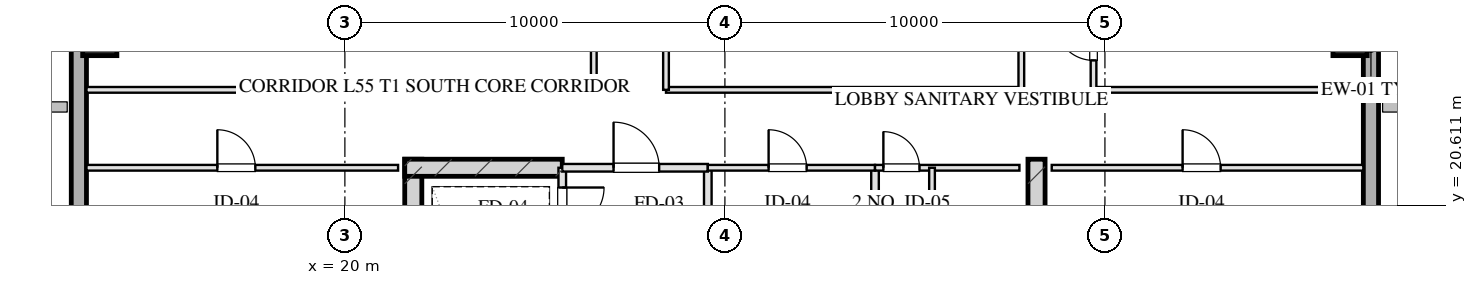
"""IFC4 building model, lengths in metres.
Left out: names, types, materials, properties, quantities, classifications, styles, units other than length and angle.
Written with IfcOpenShell. Run it as: python <this file> out.ifc"""

import sys

from ifc_helpers import new_model, si_unit, direction, frame, frame_2d, origin, origin_2d, place, context, subcontext, project, spatial, rectangle, hollow_rectangle, extrude, element, fill, save


model = new_model("IFC4")
c1 = context("Model", 3, precision=1e-05, world=origin(), true_north=direction((0.0, 1.0)))
c2 = subcontext(c1, "Body", "Model", "MODEL_VIEW")
j1 = project(units=[si_unit("LENGTHUNIT", "METRE"), si_unit("PLANEANGLEUNIT", "RADIAN")], contexts=[c1])
p1 = place(None, origin())
s1 = spatial("IfcSite", under=j1, at=p1, CompositionType="ELEMENT")
p2 = place(p1, origin())
s2 = spatial("IfcBuilding", under=s1, at=p2, CompositionType="ELEMENT")
p3 = place(p2, frame((0.0, 0.0, 205.85)))
s3 = spatial("IfcBuildingStorey", under=s2, at=p3, CompositionType="ELEMENT", Elevation=205.85)
for number, where, z_axis, x_axis in (
    (1, (21.8, 21.825, 0.0), (0.0, 0.0, 1.0), (0.0, -1.0, 0.0)),
    (2, (38.2, 21.825, 0.0), (0.0, 0.0, 1.0), (0.0, -1.0, 0.0)),
):
    element("IfcWall", number, at=place(p3, frame(where, z_axis=z_axis, x_axis=x_axis)), inside=s3, PredefinedType="SHEAR", context=c2, shape_type="SweptSolid", body=[
        extrude(rectangle(XDim=9.33, YDim=0.45, at=frame_2d((4.665, 0.0))), origin(), (0.0, 0.0, 1.0), 3.45),
    ])
p4 = place(p3, frame((21.575, 21.6, 0.0), z_axis=(0.0, 0.0, 1.0), x_axis=(1.0, 0.0, 0.0)))
e3 = element("IfcWall", 3, at=p4, inside=s3, PredefinedType="SHEAR", context=c2, shape_type="SweptSolid", body=[
    extrude(rectangle(XDim=4.145, YDim=0.45, at=frame_2d((2.073, 0.0))), origin(), (0.0, 0.0, 1.0), 3.45),
])
for number, where, z_axis, x_axis in (
    (4, (13.55, 25.0, 0.0), (0.0, 0.0, 1.0), (1.0, 0.0, 0.0)),
    (5, (46.45, 25.0, 0.0), (0.0, 0.0, 1.0), (1.0, 0.0, 0.0)),
):
    element("IfcColumn", number, at=place(p3, frame(where, z_axis=z_axis, x_axis=x_axis)), inside=s3, PredefinedType="COLUMN", context=c2, shape_type="SweptSolid", body=[
        extrude(hollow_rectangle(XDim=0.9, YDim=0.9, WallThickness=0.032, at=origin_2d()), origin(), (0.0, 0.0, 1.0), 3.451),
    ])
p5 = place(p3, frame((13.0, 10.8, 0.0), z_axis=(0.0, 0.0, 1.0), x_axis=(0.0, 1.0, 0.0)))
e6 = element("IfcWall", 6, at=p5, inside=s3, PredefinedType="SOLIDWALL", context=c2, shape_type="SweptSolid", body=[
    extrude(rectangle(XDim=46.4, YDim=0.4, at=frame_2d((23.2, 0.0))), origin(), (0.0, 0.0, 1.0), 2.61),
])
p6 = place(p5, frame((15.75, 0.0, 0.75)))
e7 = element("IfcOpeningElement", 7, at=p6, cuts=e6, PredefinedType="OPENING", context=c2, shape_type="SweptSolid", body=[
    extrude(rectangle(XDim=2.1, YDim=1.46, at=frame_2d((1.05, 0.73))), frame((0.0, 0.21, 0.0), z_axis=(0.0, -1.0, 0.0), x_axis=(1.0, 0.0, 0.0)), (0.0, 0.0, 1.0), 0.42),
])
p7 = place(p5, frame((19.55, 0.0, 0.75)))
e8 = element("IfcOpeningElement", 8, at=p7, cuts=e6, PredefinedType="OPENING", context=c2, shape_type="SweptSolid", body=[
    extrude(rectangle(XDim=2.1, YDim=1.46, at=frame_2d((1.05, 0.73))), frame((0.0, 0.21, 0.0), z_axis=(0.0, -1.0, 0.0), x_axis=(1.0, 0.0, 0.0)), (0.0, 0.0, 1.0), 0.42),
])
p8 = place(p5, frame((27.05, 0.0, 0.0)))
e9 = element("IfcOpeningElement", 9, at=p8, cuts=e6, PredefinedType="OPENING", context=c2, shape_type="SweptSolid", body=[
    extrude(rectangle(XDim=1.1, YDim=2.15, at=frame_2d((0.55, 1.075))), frame((0.0, 0.21, 0.0), z_axis=(0.0, -1.0, 0.0), x_axis=(1.0, 0.0, 0.0)), (0.0, 0.0, 1.0), 0.42),
])
p9 = place(p3, frame((47.0, 57.2, 0.0), z_axis=(0.0, 0.0, 1.0), x_axis=(0.0, -1.0, 0.0)))
e10 = element("IfcWall", 10, at=p9, inside=s3, PredefinedType="SOLIDWALL", context=c2, shape_type="SweptSolid", body=[
    extrude(rectangle(XDim=46.4, YDim=0.4, at=frame_2d((23.2, 0.0))), origin(), (0.0, 0.0, 1.0), 2.61),
])
p10 = place(p9, frame((28.55, 0.0, 0.75)))
e11 = element("IfcOpeningElement", 11, at=p10, cuts=e10, PredefinedType="OPENING", context=c2, shape_type="SweptSolid", body=[
    extrude(rectangle(XDim=2.1, YDim=1.46, at=frame_2d((1.05, 0.73))), frame((0.0, 0.21, 0.0), z_axis=(0.0, -1.0, 0.0), x_axis=(1.0, 0.0, 0.0)), (0.0, 0.0, 1.0), 0.42),
])
p11 = place(p9, frame((24.75, 0.0, 0.75)))
e12 = element("IfcOpeningElement", 12, at=p11, cuts=e10, PredefinedType="OPENING", context=c2, shape_type="SweptSolid", body=[
    extrude(rectangle(XDim=2.1, YDim=1.46, at=frame_2d((1.05, 0.73))), frame((0.0, 0.21, 0.0), z_axis=(0.0, -1.0, 0.0), x_axis=(1.0, 0.0, 0.0)), (0.0, 0.0, 1.0), 0.42),
])
p12 = place(p9, frame((16.667, 0.0, 0.0)))
e13 = element("IfcOpeningElement", 13, at=p12, cuts=e10, PredefinedType="OPENING", context=c2, shape_type="SweptSolid", body=[
    extrude(rectangle(XDim=1.1, YDim=2.15, at=frame_2d((0.55, 1.075))), frame((0.0, 0.21, 0.0), z_axis=(0.0, -1.0, 0.0), x_axis=(1.0, 0.0, 0.0)), (0.0, 0.0, 1.0), 0.42),
])
p13 = place(p3, frame((25.72, 21.6, 0.0), z_axis=(0.0, 0.0, 1.0), x_axis=(0.0, -1.0, 0.0)))
e14 = element("IfcWall", 14, at=p13, inside=s3, PredefinedType="PARTITIONING", context=c2, shape_type="SweptSolid", body=[
    extrude(rectangle(XDim=1.9, YDim=0.2, at=frame_2d((0.95, 0.0))), origin(), (0.0, 0.0, 1.0), 3.175),
])
p14 = place(p13, frame((0.52, 0.0, 0.0)))
e15 = element("IfcOpeningElement", 15, at=p14, cuts=e14, PredefinedType="OPENING", context=c2, shape_type="SweptSolid", body=[
    extrude(rectangle(XDim=1.1, YDim=2.05, at=frame_2d((0.55, 1.025))), frame((0.0, 0.11, 0.0), z_axis=(0.0, -1.0, 0.0), x_axis=(1.0, 0.0, 0.0)), (0.0, 0.0, 1.0), 0.22),
])
p15 = place(p3, frame((29.55, 21.6, 0.0), z_axis=(0.0, 0.0, 1.0), x_axis=(0.0, -1.0, 0.0)))
e16 = element("IfcWall", 16, at=p15, inside=s3, PredefinedType="PARTITIONING", context=c2, shape_type="SweptSolid", body=[
    extrude(rectangle(XDim=8.43, YDim=0.2, at=frame_2d((4.215, 0.0))), origin(), (0.0, 0.0, 1.0), 3.175),
])
p16 = place(p3, frame((25.72, 21.6, 0.0), z_axis=(0.0, 0.0, 1.0), x_axis=(1.0, 0.0, 0.0)))
e17 = element("IfcWall", 17, at=p16, inside=s3, PredefinedType="PARTITIONING", context=c2, shape_type="SweptSolid", body=[
    extrude(rectangle(XDim=3.83, YDim=0.2, at=frame_2d((1.915, 0.0))), origin(), (0.0, 0.0, 1.0), 3.175),
])
p17 = place(p16, frame((1.35, 0.0, 0.0)))
e18 = element("IfcOpeningElement", 18, at=p17, cuts=e17, PredefinedType="OPENING", context=c2, shape_type="SweptSolid", body=[
    extrude(rectangle(XDim=1.2, YDim=2.05, at=frame_2d((0.6, 1.025))), frame((0.0, 0.11, 0.0), z_axis=(0.0, -1.0, 0.0), x_axis=(1.0, 0.0, 0.0)), (0.0, 0.0, 1.0), 0.22),
])
p18 = place(p3, frame((33.95, 21.6, 0.0), z_axis=(0.0, 0.0, 1.0), x_axis=(0.0, -1.0, 0.0)))
e19 = element("IfcWall", 19, at=p18, inside=s3, PredefinedType="PARTITIONING", context=c2, shape_type="SweptSolid", body=[
    extrude(rectangle(XDim=8.43, YDim=0.2, at=frame_2d((4.215, 0.0))), origin(), (0.0, 0.0, 1.0), 3.175),
])
p19 = place(p3, frame((29.55, 21.6, 0.0), z_axis=(0.0, 0.0, 1.0), x_axis=(1.0, 0.0, 0.0)))
e20 = element("IfcWall", 20, at=p19, inside=s3, PredefinedType="PARTITIONING", context=c2, shape_type="SweptSolid", body=[
    extrude(rectangle(XDim=4.4, YDim=0.15, at=frame_2d((2.2, 0.0))), origin(), (0.0, 0.0, 1.0), 3.175),
])
p20 = place(p19, frame((1.6, 0.0, 0.0)))
e21 = element("IfcOpeningElement", 21, at=p20, cuts=e20, PredefinedType="OPENING", context=c2, shape_type="SweptSolid", body=[
    extrude(rectangle(XDim=1.0, YDim=2.05, at=frame_2d((0.5, 1.025))), frame((0.0, 0.085, 0.0), z_axis=(0.0, -1.0, 0.0), x_axis=(1.0, 0.0, 0.0)), (0.0, 0.0, 1.0), 0.17),
])
p21 = place(p3, frame((33.95, 21.6, 0.0), z_axis=(0.0, 0.0, 1.0), x_axis=(1.0, 0.0, 0.0)))
e22 = element("IfcWall", 22, at=p21, inside=s3, PredefinedType="PARTITIONING", context=c2, shape_type="SweptSolid", body=[
    extrude(rectangle(XDim=3.8, YDim=0.15, at=frame_2d((1.9, 0.0))), origin(), (0.0, 0.0, 1.0), 3.175),
])
p22 = place(p21, frame((0.22, 0.0, 0.0)))
e23 = element("IfcOpeningElement", 23, at=p22, cuts=e22, PredefinedType="OPENING", context=c2, shape_type="SweptSolid", body=[
    extrude(rectangle(XDim=0.95, YDim=2.05, at=frame_2d((0.475, 1.025))), frame((0.0, 0.085, 0.0), z_axis=(0.0, -1.0, 0.0), x_axis=(1.0, 0.0, 0.0)), (0.0, 0.0, 1.0), 0.17),
])
p23 = place(p3, frame((35.45, 21.6, 0.0), z_axis=(0.0, 0.0, 1.0), x_axis=(0.0, -1.0, 0.0)))
e24 = element("IfcWall", 24, at=p23, inside=s3, PredefinedType="PARTITIONING", context=c2, shape_type="SweptSolid", body=[
    extrude(rectangle(XDim=8.43, YDim=0.15, at=frame_2d((4.215, 0.0))), origin(), (0.0, 0.0, 1.0), 2.815),
])
p24 = place(p23, frame((2.55, 0.0, 0.0)))
e25 = element("IfcOpeningElement", 25, at=p24, cuts=e24, PredefinedType="OPENING", context=c2, shape_type="SweptSolid", body=[
    extrude(rectangle(XDim=0.95, YDim=2.05, at=frame_2d((0.475, 1.025))), frame((0.0, 0.085, 0.0), z_axis=(0.0, -1.0, 0.0), x_axis=(1.0, 0.0, 0.0)), (0.0, 0.0, 1.0), 0.17),
])
p25 = place(p23, frame((4.7, 0.0, 0.0)))
e26 = element("IfcOpeningElement", 26, at=p25, cuts=e24, PredefinedType="OPENING", context=c2, shape_type="SweptSolid", body=[
    extrude(rectangle(XDim=0.9, YDim=2.05, at=frame_2d((0.45, 1.025))), frame((0.0, 0.085, 0.0), z_axis=(0.0, -1.0, 0.0), x_axis=(1.0, 0.0, 0.0)), (0.0, 0.0, 1.0), 0.17),
])
p26 = place(p23, frame((6.8, 0.0, 0.0)))
e27 = element("IfcOpeningElement", 27, at=p26, cuts=e24, PredefinedType="OPENING", context=c2, shape_type="SweptSolid", body=[
    extrude(rectangle(XDim=0.9, YDim=2.05, at=frame_2d((0.45, 1.025))), frame((0.0, 0.085, 0.0), z_axis=(0.0, -1.0, 0.0), x_axis=(1.0, 0.0, 0.0)), (0.0, 0.0, 1.0), 0.17),
])
p27 = place(p3, frame((13.2, 21.6, 0.0), z_axis=(0.0, 0.0, 1.0), x_axis=(1.0, 0.0, 0.0)))
e28 = element("IfcWall", 28, at=p27, inside=s3, PredefinedType="PARTITIONING", context=c2, shape_type="SweptSolid", body=[
    extrude(rectangle(XDim=8.2, YDim=0.15, at=frame_2d((4.1, 0.0))), origin(), (0.0, 0.0, 1.0), 3.175),
])
p28 = place(p27, frame((3.444, 0.0, 0.0)))
e29 = element("IfcOpeningElement", 29, at=p28, cuts=e28, PredefinedType="OPENING", context=c2, shape_type="SweptSolid", body=[
    extrude(rectangle(XDim=1.0, YDim=2.05, at=frame_2d((0.5, 1.025))), frame((0.0, 0.085, 0.0), z_axis=(0.0, -1.0, 0.0), x_axis=(1.0, 0.0, 0.0)), (0.0, 0.0, 1.0), 0.17),
])
p29 = place(p3, frame((38.6, 21.6, 0.0), z_axis=(0.0, 0.0, 1.0), x_axis=(1.0, 0.0, 0.0)))
e30 = element("IfcWall", 30, at=p29, inside=s3, PredefinedType="PARTITIONING", context=c2, shape_type="SweptSolid", body=[
    extrude(rectangle(XDim=8.2, YDim=0.15, at=frame_2d((4.1, 0.0))), origin(), (0.0, 0.0, 1.0), 3.175),
])
p30 = place(p29, frame((3.444, 0.0, 0.0)))
e31 = element("IfcOpeningElement", 31, at=p30, cuts=e30, PredefinedType="OPENING", context=c2, shape_type="SweptSolid", body=[
    extrude(rectangle(XDim=1.0, YDim=2.05, at=frame_2d((0.5, 1.025))), frame((0.0, 0.085, 0.0), z_axis=(0.0, -1.0, 0.0), x_axis=(1.0, 0.0, 0.0)), (0.0, 0.0, 1.0), 0.17),
])
p31 = place(p3, frame((13.2, 23.65, 0.0), z_axis=(0.0, 0.0, 1.0), x_axis=(1.0, 0.0, 0.0)))
e32 = element("IfcWall", 32, at=p31, inside=s3, PredefinedType="PARTITIONING", context=c2, shape_type="SweptSolid", body=[
    extrude(rectangle(XDim=13.35, YDim=0.15, at=frame_2d((6.675, 0.0))), origin(), (0.0, 0.0, 1.0), 3.175),
])
p32 = place(p3, frame((28.45, 23.65, 0.0), z_axis=(0.0, 0.0, 1.0), x_axis=(1.0, 0.0, 0.0)))
e33 = element("IfcWall", 33, at=p32, inside=s3, PredefinedType="PARTITIONING", context=c2, shape_type="SweptSolid", body=[
    extrude(rectangle(XDim=9.35, YDim=0.15, at=frame_2d((4.675, 0.0))), origin(), (0.0, 0.0, 1.0), 3.175),
])
p33 = place(p3, frame((39.7, 23.65, 0.0), z_axis=(0.0, 0.0, 1.0), x_axis=(1.0, 0.0, 0.0)))
e34 = element("IfcWall", 34, at=p33, inside=s3, PredefinedType="PARTITIONING", context=c2, shape_type="SweptSolid", body=[
    extrude(rectangle(XDim=7.1, YDim=0.15, at=frame_2d((3.55, 0.0))), origin(), (0.0, 0.0, 1.0), 3.175),
])
p34 = place(p3, frame((26.55, 23.65, 0.0), z_axis=(0.0, 0.0, 1.0), x_axis=(0.0, 1.0, 0.0)))
e35 = element("IfcWall", 35, at=p34, inside=s3, PredefinedType="PARTITIONING", context=c2, shape_type="SweptSolid", body=[
    extrude(rectangle(XDim=20.7, YDim=0.15, at=frame_2d((10.35, 0.0))), origin(), (0.0, 0.0, 1.0), 3.175),
])
p35 = place(p34, frame((4.075, 0.0, 0.0)))
e36 = element("IfcOpeningElement", 36, at=p35, cuts=e35, PredefinedType="OPENING", context=c2, shape_type="SweptSolid", body=[
    extrude(rectangle(XDim=1.0, YDim=2.05, at=frame_2d((0.5, 1.025))), frame((0.0, 0.085, 0.0), z_axis=(0.0, -1.0, 0.0), x_axis=(1.0, 0.0, 0.0)), (0.0, 0.0, 1.0), 0.17),
])
p36 = place(p34, frame((14.425, 0.0, 0.0)))
e37 = element("IfcOpeningElement", 37, at=p36, cuts=e35, PredefinedType="OPENING", context=c2, shape_type="SweptSolid", body=[
    extrude(rectangle(XDim=1.0, YDim=2.05, at=frame_2d((0.5, 1.025))), frame((0.0, 0.085, 0.0), z_axis=(0.0, -1.0, 0.0), x_axis=(1.0, 0.0, 0.0)), (0.0, 0.0, 1.0), 0.17),
])
p37 = place(p3, frame((28.45, 23.65, 0.0), z_axis=(0.0, 0.0, 1.0), x_axis=(0.0, 1.0, 0.0)))
e38 = element("IfcWall", 38, at=p37, inside=s3, PredefinedType="PARTITIONING", context=c2, shape_type="SweptSolid", body=[
    extrude(rectangle(XDim=20.7, YDim=0.15, at=frame_2d((10.35, 0.0))), origin(), (0.0, 0.0, 1.0), 3.175),
])
p38 = place(p37, frame((9.936, 0.0, 0.0)))
e39 = element("IfcOpeningElement", 39, at=p38, cuts=e38, PredefinedType="OPENING", context=c2, shape_type="SweptSolid", body=[
    extrude(rectangle(XDim=1.1, YDim=2.05, at=frame_2d((0.55, 1.025))), frame((0.0, 0.085, 0.0), z_axis=(0.0, -1.0, 0.0), x_axis=(1.0, 0.0, 0.0)), (0.0, 0.0, 1.0), 0.17),
])
p39 = place(p3, frame((37.8, 23.65, 0.0), z_axis=(0.0, 0.0, 1.0), x_axis=(0.0, 1.0, 0.0)))
e40 = element("IfcWall", 40, at=p39, inside=s3, PredefinedType="PARTITIONING", context=c2, shape_type="SweptSolid", body=[
    extrude(rectangle(XDim=20.7, YDim=0.15, at=frame_2d((10.35, 0.0))), origin(), (0.0, 0.0, 1.0), 3.175),
])
p40 = place(p3, frame((39.7, 23.65, 0.0), z_axis=(0.0, 0.0, 1.0), x_axis=(0.0, 1.0, 0.0)))
e41 = element("IfcWall", 41, at=p40, inside=s3, PredefinedType="PARTITIONING", context=c2, shape_type="SweptSolid", body=[
    extrude(rectangle(XDim=20.7, YDim=0.15, at=frame_2d((10.35, 0.0))), origin(), (0.0, 0.0, 1.0), 3.175),
])
p41 = place(p40, frame((0.775, 0.0, 0.0)))
e42 = element("IfcOpeningElement", 42, at=p41, cuts=e41, PredefinedType="OPENING", context=c2, shape_type="SweptSolid", body=[
    extrude(rectangle(XDim=1.0, YDim=2.05, at=frame_2d((0.5, 1.025))), frame((0.0, 0.085, 0.0), z_axis=(0.0, -1.0, 0.0), x_axis=(1.0, 0.0, 0.0)), (0.0, 0.0, 1.0), 0.17),
])
p42 = place(p40, frame((3.95, 0.0, 0.0)))
e43 = element("IfcOpeningElement", 43, at=p42, cuts=e41, PredefinedType="OPENING", context=c2, shape_type="SweptSolid", body=[
    extrude(rectangle(XDim=1.0, YDim=2.05, at=frame_2d((0.5, 1.025))), frame((0.0, 0.085, 0.0), z_axis=(0.0, -1.0, 0.0), x_axis=(1.0, 0.0, 0.0)), (0.0, 0.0, 1.0), 0.17),
])
p43 = place(p40, frame((8.19, 0.0, 0.0)))
e44 = element("IfcOpeningElement", 44, at=p43, cuts=e41, PredefinedType="OPENING", context=c2, shape_type="SweptSolid", body=[
    extrude(rectangle(XDim=1.0, YDim=2.05, at=frame_2d((0.5, 1.025))), frame((0.0, 0.085, 0.0), z_axis=(0.0, -1.0, 0.0), x_axis=(1.0, 0.0, 0.0)), (0.0, 0.0, 1.0), 0.17),
])
p44 = place(p40, frame((12.373, 0.0, 0.0)))
e45 = element("IfcOpeningElement", 45, at=p44, cuts=e41, PredefinedType="OPENING", context=c2, shape_type="SweptSolid", body=[
    extrude(rectangle(XDim=1.0, YDim=2.05, at=frame_2d((0.5, 1.025))), frame((0.0, 0.085, 0.0), z_axis=(0.0, -1.0, 0.0), x_axis=(1.0, 0.0, 0.0)), (0.0, 0.0, 1.0), 0.17),
])
p45 = place(p40, frame((15.933, 0.0, 0.0)))
e46 = element("IfcOpeningElement", 46, at=p45, cuts=e41, PredefinedType="OPENING", context=c2, shape_type="SweptSolid", body=[
    extrude(rectangle(XDim=1.0, YDim=2.05, at=frame_2d((0.5, 1.025))), frame((0.0, 0.085, 0.0), z_axis=(0.0, -1.0, 0.0), x_axis=(1.0, 0.0, 0.0)), (0.0, 0.0, 1.0), 0.17),
])
p46 = place(p40, frame((18.925, 0.0, 0.0)))
e47 = element("IfcOpeningElement", 47, at=p46, cuts=e41, PredefinedType="OPENING", context=c2, shape_type="SweptSolid", body=[
    extrude(rectangle(XDim=1.0, YDim=2.05, at=frame_2d((0.5, 1.025))), frame((0.0, 0.085, 0.0), z_axis=(0.0, -1.0, 0.0), x_axis=(1.0, 0.0, 0.0)), (0.0, 0.0, 1.0), 0.17),
])
p47 = place(p14, origin())
e48 = element("IfcDoor", 48, at=p47, inside=s3, OperationType="SINGLE_SWING_LEFT", PredefinedType="DOOR", context=c2, shape_type="SweptSolid", body=[
    extrude(rectangle(XDim=1.1, YDim=2.05, at=frame_2d((0.55, 1.025))), frame((0.0, 0.025, 0.0), z_axis=(0.0, -1.0, 0.0), x_axis=(1.0, 0.0, 0.0)), (0.0, 0.0, 1.0), 0.05),
])
fill(e15, e48)
p48 = place(p17, origin())
e49 = element("IfcDoor", 49, at=p48, inside=s3, OperationType="SINGLE_SWING_LEFT", PredefinedType="DOOR", context=c2, shape_type="SweptSolid", body=[
    extrude(rectangle(XDim=1.2, YDim=2.05, at=frame_2d((0.6, 1.025))), frame((0.0, 0.025, 0.0), z_axis=(0.0, -1.0, 0.0), x_axis=(1.0, 0.0, 0.0)), (0.0, 0.0, 1.0), 0.05),
])
fill(e18, e49)
p49 = place(p20, origin())
e50 = element("IfcDoor", 50, at=p49, inside=s3, OperationType="SINGLE_SWING_LEFT", PredefinedType="DOOR", context=c2, shape_type="SweptSolid", body=[
    extrude(rectangle(XDim=1.0, YDim=2.05, at=frame_2d((0.5, 1.025))), frame((0.0, 0.025, 0.0), z_axis=(0.0, -1.0, 0.0), x_axis=(1.0, 0.0, 0.0)), (0.0, 0.0, 1.0), 0.05),
])
fill(e21, e50)
p50 = place(p22, origin())
e51 = element("IfcDoor", 51, at=p50, inside=s3, OperationType="SINGLE_SWING_LEFT", PredefinedType="DOOR", context=c2, shape_type="SweptSolid", body=[
    extrude(rectangle(XDim=0.95, YDim=2.05, at=frame_2d((0.475, 1.025))), frame((0.0, 0.025, 0.0), z_axis=(0.0, -1.0, 0.0), x_axis=(1.0, 0.0, 0.0)), (0.0, 0.0, 1.0), 0.05),
])
fill(e23, e51)
p51 = place(p28, origin())
e52 = element("IfcDoor", 52, at=p51, inside=s3, OperationType="SINGLE_SWING_LEFT", PredefinedType="DOOR", context=c2, shape_type="SweptSolid", body=[
    extrude(rectangle(XDim=1.0, YDim=2.05, at=frame_2d((0.5, 1.025))), frame((0.0, 0.025, 0.0), z_axis=(0.0, -1.0, 0.0), x_axis=(1.0, 0.0, 0.0)), (0.0, 0.0, 1.0), 0.05),
])
fill(e29, e52)
p52 = place(p30, origin())
e53 = element("IfcDoor", 53, at=p52, inside=s3, OperationType="SINGLE_SWING_LEFT", PredefinedType="DOOR", context=c2, shape_type="SweptSolid", body=[
    extrude(rectangle(XDim=1.0, YDim=2.05, at=frame_2d((0.5, 1.025))), frame((0.0, 0.025, 0.0), z_axis=(0.0, -1.0, 0.0), x_axis=(1.0, 0.0, 0.0)), (0.0, 0.0, 1.0), 0.05),
])
fill(e31, e53)
p53 = place(p41, origin())
e54 = element("IfcDoor", 54, at=p53, inside=s3, OperationType="SINGLE_SWING_RIGHT", PredefinedType="DOOR", context=c2, shape_type="SweptSolid", body=[
    extrude(rectangle(XDim=1.0, YDim=2.05, at=frame_2d((0.5, 1.025))), frame((0.0, 0.025, 0.0), z_axis=(0.0, -1.0, 0.0), x_axis=(1.0, 0.0, 0.0)), (0.0, 0.0, 1.0), 0.05),
])
fill(e42, e54)
save(model, sys.argv[1])
